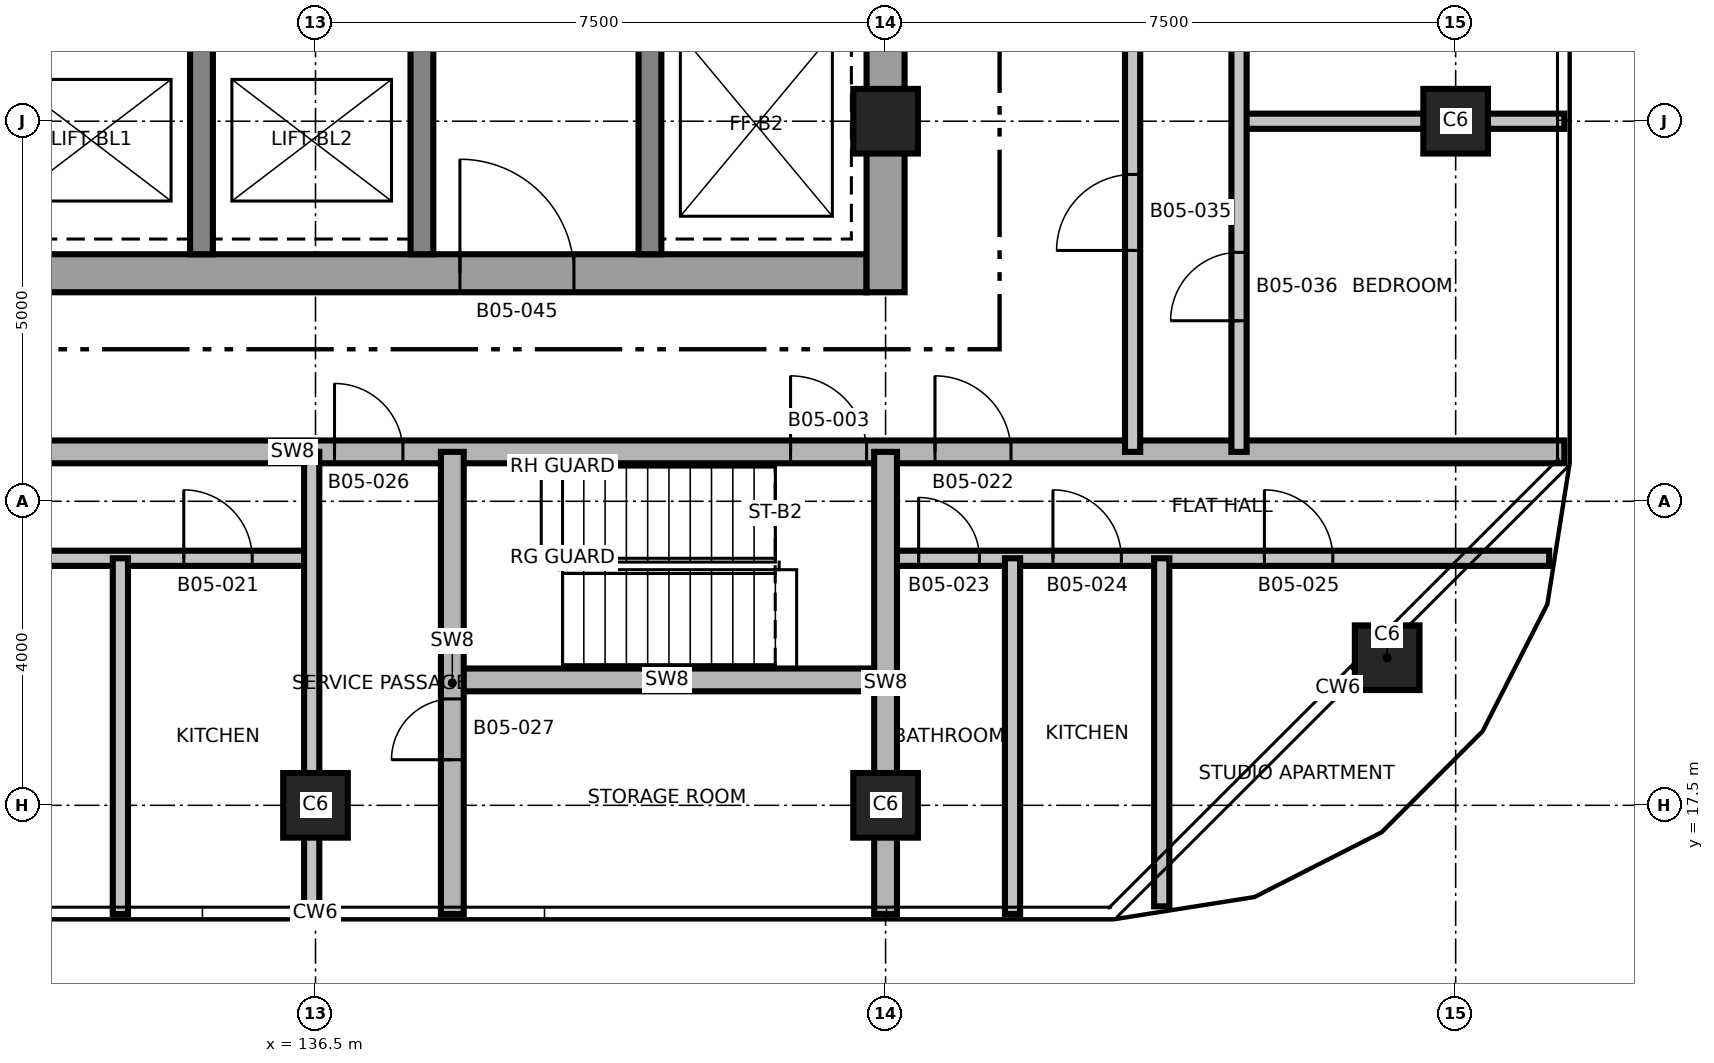
"""IFC4 building model, lengths in metres.
Left out: names, types, materials, properties, quantities, classifications, styles, units other than length and angle.
Written with IfcOpenShell. Run it as: python <this file> out.ifc"""

import sys

from ifc_helpers import new_model, si_unit, direction, frame, frame_2d, origin, origin_2d, place, context, subcontext, project, spatial, rectangle, extrude, element, fill, save


model = new_model("IFC4")
c1 = context("Model", 3, precision=1e-05, world=origin(), true_north=direction((0.0, 1.0)))
c2 = subcontext(c1, "Body", "Model", "MODEL_VIEW")
j1 = project(units=[si_unit("LENGTHUNIT", "METRE"), si_unit("PLANEANGLEUNIT", "RADIAN")], contexts=[c1])
p1 = place(None, origin())
s1 = spatial("IfcSite", under=j1, at=p1, CompositionType="ELEMENT")
p2 = place(p1, origin())
s2 = spatial("IfcBuilding", under=s1, at=p2, CompositionType="ELEMENT")
p3 = place(p2, frame((0.0, 0.0, 70.5)))
s3 = spatial("IfcBuildingStorey", under=s2, at=p3, CompositionType="ELEMENT", Elevation=70.5)
p4 = place(p3, frame((128.75, 24.5, 0.0), z_axis=(0.0, 0.0, 1.0), x_axis=(1.0, 0.0, 0.0)))
e1 = element("IfcWall", 1, at=p4, inside=s3, PredefinedType="SHEAR", context=c2, shape_type="SweptSolid", body=[
    extrude(rectangle(XDim=15.0, YDim=0.5, at=frame_2d((7.5, 0.0))), origin(), (0.0, 0.0, 1.0), 3.7),
])
p5 = place(p4, frame((9.65, 0.0, 0.0)))
e2 = element("IfcOpeningElement", 2, at=p5, cuts=e1, PredefinedType="OPENING", context=c2, shape_type="SweptSolid", body=[
    extrude(rectangle(XDim=1.5, YDim=2.1, at=frame_2d((0.75, 1.05))), frame((0.0, 0.26, 0.0), z_axis=(0.0, -1.0, 0.0), x_axis=(1.0, 0.0, 0.0)), (0.0, 0.0, 1.0), 0.52),
])
p6 = place(p4, frame((1.25, 0.0, 0.0)))
e3 = element("IfcOpeningElement", 3, at=p6, cuts=e1, PredefinedType="OPENING", context=c2, shape_type="SweptSolid", body=[
    extrude(rectangle(XDim=0.9, YDim=2.1, at=frame_2d((0.45, 1.05))), frame((0.0, 0.26, 0.0), z_axis=(0.0, -1.0, 0.0), x_axis=(1.0, 0.0, 0.0)), (0.0, 0.0, 1.0), 0.52),
])
p7 = place(p3, frame((144.0, 24.25, 0.0), z_axis=(0.0, 0.0, 1.0), x_axis=(0.0, 1.0, 0.0)))
e4 = element("IfcWall", 4, at=p7, inside=s3, PredefinedType="SHEAR", context=c2, shape_type="SweptSolid", body=[
    extrude(rectangle(XDim=13.5, YDim=0.5, at=frame_2d((6.75, 0.0))), origin(), (0.0, 0.0, 1.0), 3.7),
])
p8 = place(p3, frame((137.9, 24.75, 0.0), z_axis=(0.0, 0.0, 1.0), x_axis=(0.0, 1.0, 0.0)))
e5 = element("IfcWall", 5, at=p8, inside=s3, PredefinedType="SHEAR", context=c2, shape_type="SweptSolid", body=[
    extrude(rectangle(XDim=12.5, YDim=0.3, at=frame_2d((6.25, 0.0))), origin(), (0.0, 0.0, 1.0), 3.7),
])
p9 = place(p8, frame((3.95, 0.0, 0.0)))
e6 = element("IfcOpeningElement", 6, at=p9, cuts=e5, PredefinedType="OPENING", context=c2, shape_type="SweptSolid", body=[
    extrude(rectangle(XDim=1.5, YDim=2.1, at=frame_2d((0.75, 1.05))), frame((0.0, 0.16, 0.0), z_axis=(0.0, -1.0, 0.0), x_axis=(1.0, 0.0, 0.0)), (0.0, 0.0, 1.0), 0.32),
])
p10 = place(p8, frame((10.45, 0.0, 0.0)))
e7 = element("IfcOpeningElement", 7, at=p10, cuts=e5, PredefinedType="OPENING", context=c2, shape_type="SweptSolid", body=[
    extrude(rectangle(XDim=0.9, YDim=2.1, at=frame_2d((0.45, 1.05))), frame((0.0, 0.16, 0.0), z_axis=(0.0, -1.0, 0.0), x_axis=(1.0, 0.0, 0.0)), (0.0, 0.0, 1.0), 0.32),
])
p11 = place(p3, frame((140.9, 24.75, 0.0), z_axis=(0.0, 0.0, 1.0), x_axis=(0.0, 1.0, 0.0)))
e8 = element("IfcWall", 8, at=p11, inside=s3, PredefinedType="SHEAR", context=c2, shape_type="SweptSolid", body=[
    extrude(rectangle(XDim=12.5, YDim=0.3, at=frame_2d((6.25, 0.0))), origin(), (0.0, 0.0, 1.0), 3.7),
])
p12 = place(p11, frame((5.9, 0.0, 0.0)))
e9 = element("IfcOpeningElement", 9, at=p12, cuts=e8, PredefinedType="OPENING", context=c2, shape_type="SweptSolid", body=[
    extrude(rectangle(XDim=1.2, YDim=2.1, at=frame_2d((0.6, 1.05))), frame((0.0, 0.16, 0.0), z_axis=(0.0, -1.0, 0.0), x_axis=(1.0, 0.0, 0.0)), (0.0, 0.0, 1.0), 0.32),
])
p13 = place(p3, frame((135.0, 24.75, 0.0), z_axis=(0.0, 0.0, 1.0), x_axis=(0.0, 1.0, 0.0)))
e10 = element("IfcWall", 10, at=p13, inside=s3, PredefinedType="SHEAR", context=c2, shape_type="SweptSolid", body=[
    extrude(rectangle(XDim=2.8, YDim=0.3, at=frame_2d((1.4, 0.0))), origin(), (0.0, 0.0, 1.0), 3.7),
])
for number, where, z_axis, x_axis in (
    (11, (136.5, 17.5, 0.0), (0.0, 0.0, 1.0), (1.0, 0.0, 0.0)),
    (12, (144.0, 17.5, 0.0), (0.0, 0.0, 1.0), (1.0, 0.0, 0.0)),
    (13, (150.599, 19.442, 0.0), (0.0, 0.0, 1.0), (1.0, 0.0, 0.0)),
    (14, (144.0, 26.5, 0.0), (0.0, 0.0, 1.0), (1.0, 0.0, 0.0)),
    (15, (151.5, 26.5, 0.0), (0.0, 0.0, 1.0), (1.0, 0.0, 0.0)),
):
    element("IfcColumn", number, at=place(p3, frame(where, z_axis=z_axis, x_axis=x_axis)), inside=s3, PredefinedType="COLUMN", context=c2, shape_type="SweptSolid", body=[
        extrude(rectangle(XDim=0.85, YDim=0.85, at=origin_2d()), origin(), (0.0, 0.0, 1.0), 3.7),
    ])
p14 = place(p3, frame((138.25, 19.15, 0.0), z_axis=(0.0, 0.0, 1.0), x_axis=(1.0, 0.0, 0.0)))
e16 = element("IfcWall", 16, at=p14, inside=s3, PredefinedType="SHEAR", context=c2, shape_type="SweptSolid", body=[
    extrude(rectangle(XDim=5.75, YDim=0.3, at=frame_2d((2.875, 0.0))), origin(), (0.0, 0.0, 1.0), 3.4),
])
p15 = place(p3, frame((120.269, 20.75, 0.0), z_axis=(0.0, 0.0, 1.0), x_axis=(1.0, 0.0, 0.0)))
e17 = element("IfcWall", 17, at=p15, inside=s3, PredefinedType="PARTITIONING", context=c2, shape_type="SweptSolid", body=[
    extrude(rectangle(XDim=16.231, YDim=0.2, at=frame_2d((8.115, 0.0))), origin(), (0.0, 0.0, 1.0), 3.4),
])
p16 = place(p15, frame((0.414, 0.0, 0.0)))
e18 = element("IfcOpeningElement", 18, at=p16, cuts=e17, PredefinedType="OPENING", context=c2, shape_type="SweptSolid", body=[
    extrude(rectangle(XDim=0.9, YDim=2.1, at=frame_2d((0.45, 1.05))), frame((0.0, 0.11, 0.0), z_axis=(0.0, -1.0, 0.0), x_axis=(1.0, 0.0, 0.0)), (0.0, 0.0, 1.0), 0.22),
])
p17 = place(p15, frame((4.581, 0.0, 0.0)))
e19 = element("IfcOpeningElement", 19, at=p17, cuts=e17, PredefinedType="OPENING", context=c2, shape_type="SweptSolid", body=[
    extrude(rectangle(XDim=0.9, YDim=2.1, at=frame_2d((0.45, 1.05))), frame((0.0, 0.11, 0.0), z_axis=(0.0, -1.0, 0.0), x_axis=(1.0, 0.0, 0.0)), (0.0, 0.0, 1.0), 0.22),
])
p18 = place(p15, frame((7.381, 0.0, 0.0)))
e20 = element("IfcOpeningElement", 20, at=p18, cuts=e17, PredefinedType="OPENING", context=c2, shape_type="SweptSolid", body=[
    extrude(rectangle(XDim=0.8, YDim=2.1, at=frame_2d((0.4, 1.05))), frame((0.0, 0.11, 0.0), z_axis=(0.0, -1.0, 0.0), x_axis=(1.0, 0.0, 0.0)), (0.0, 0.0, 1.0), 0.22),
])
p19 = place(p15, frame((10.748, 0.0, 0.0)))
e21 = element("IfcOpeningElement", 21, at=p19, cuts=e17, PredefinedType="OPENING", context=c2, shape_type="SweptSolid", body=[
    extrude(rectangle(XDim=0.9, YDim=2.1, at=frame_2d((0.45, 1.05))), frame((0.0, 0.11, 0.0), z_axis=(0.0, -1.0, 0.0), x_axis=(1.0, 0.0, 0.0)), (0.0, 0.0, 1.0), 0.22),
])
p20 = place(p15, frame((14.498, 0.0, 0.0)))
e22 = element("IfcOpeningElement", 22, at=p20, cuts=e17, PredefinedType="OPENING", context=c2, shape_type="SweptSolid", body=[
    extrude(rectangle(XDim=0.9, YDim=2.1, at=frame_2d((0.45, 1.05))), frame((0.0, 0.11, 0.0), z_axis=(0.0, -1.0, 0.0), x_axis=(1.0, 0.0, 0.0)), (0.0, 0.0, 1.0), 0.22),
])
p21 = place(p3, frame((144.0, 20.75, 0.0), z_axis=(0.0, 0.0, 1.0), x_axis=(1.0, 0.0, 0.0)))
e23 = element("IfcWall", 23, at=p21, inside=s3, PredefinedType="PARTITIONING", context=c2, shape_type="SweptSolid", body=[
    extrude(rectangle(XDim=8.731, YDim=0.2, at=frame_2d((4.365, 0.0))), origin(), (0.0, 0.0, 1.0), 3.4),
])
p22 = place(p21, frame((0.435, 0.0, 0.0)))
e24 = element("IfcOpeningElement", 24, at=p22, cuts=e23, PredefinedType="OPENING", context=c2, shape_type="SweptSolid", body=[
    extrude(rectangle(XDim=0.8, YDim=2.1, at=frame_2d((0.4, 1.05))), frame((0.0, 0.11, 0.0), z_axis=(0.0, -1.0, 0.0), x_axis=(1.0, 0.0, 0.0)), (0.0, 0.0, 1.0), 0.22),
])
p23 = place(p21, frame((2.202, 0.0, 0.0)))
e25 = element("IfcOpeningElement", 25, at=p23, cuts=e23, PredefinedType="OPENING", context=c2, shape_type="SweptSolid", body=[
    extrude(rectangle(XDim=0.9, YDim=2.1, at=frame_2d((0.45, 1.05))), frame((0.0, 0.11, 0.0), z_axis=(0.0, -1.0, 0.0), x_axis=(1.0, 0.0, 0.0)), (0.0, 0.0, 1.0), 0.22),
])
p24 = place(p21, frame((4.984, 0.0, 0.0)))
e26 = element("IfcOpeningElement", 26, at=p24, cuts=e23, PredefinedType="OPENING", context=c2, shape_type="SweptSolid", body=[
    extrude(rectangle(XDim=0.9, YDim=2.1, at=frame_2d((0.45, 1.05))), frame((0.0, 0.11, 0.0), z_axis=(0.0, -1.0, 0.0), x_axis=(1.0, 0.0, 0.0)), (0.0, 0.0, 1.0), 0.22),
])
p25 = place(p3, frame((120.07, 22.15, 0.0), z_axis=(0.0, 0.0, 1.0), x_axis=(1.0, 0.0, 0.0)))
e27 = element("IfcWall", 27, at=p25, inside=s3, PredefinedType="SHEAR", context=c2, shape_type="SweptSolid", body=[
    extrude(rectangle(XDim=32.86, YDim=0.3, at=frame_2d((16.43, 0.0))), origin(), (0.0, 0.0, 1.0), 3.4),
])
p26 = place(p25, frame((22.68, 0.0, 0.0)))
e28 = element("IfcOpeningElement", 28, at=p26, cuts=e27, PredefinedType="OPENING", context=c2, shape_type="SweptSolid", body=[
    extrude(rectangle(XDim=1.0, YDim=2.1, at=frame_2d((0.5, 1.05))), frame((0.0, 0.16, 0.0), z_axis=(0.0, -1.0, 0.0), x_axis=(1.0, 0.0, 0.0)), (0.0, 0.0, 1.0), 0.32),
])
p27 = place(p25, frame((11.03, 0.0, 0.0)))
e29 = element("IfcOpeningElement", 29, at=p27, cuts=e27, PredefinedType="OPENING", context=c2, shape_type="SweptSolid", body=[
    extrude(rectangle(XDim=1.0, YDim=2.1, at=frame_2d((0.5, 1.05))), frame((0.0, 0.16, 0.0), z_axis=(0.0, -1.0, 0.0), x_axis=(1.0, 0.0, 0.0)), (0.0, 0.0, 1.0), 0.32),
])
p28 = place(p25, frame((24.58, 0.0, 0.0)))
e30 = element("IfcOpeningElement", 30, at=p28, cuts=e27, PredefinedType="OPENING", context=c2, shape_type="SweptSolid", body=[
    extrude(rectangle(XDim=1.0, YDim=2.1, at=frame_2d((0.5, 1.05))), frame((0.0, 0.16, 0.0), z_axis=(0.0, -1.0, 0.0), x_axis=(1.0, 0.0, 0.0)), (0.0, 0.0, 1.0), 0.32),
])
p29 = place(p25, frame((16.68, 0.0, 0.0)))
e31 = element("IfcOpeningElement", 31, at=p29, cuts=e27, PredefinedType="OPENING", context=c2, shape_type="SweptSolid", body=[
    extrude(rectangle(XDim=0.9, YDim=2.1, at=frame_2d((0.45, 1.05))), frame((0.0, 0.16, 0.0), z_axis=(0.0, -1.0, 0.0), x_axis=(1.0, 0.0, 0.0)), (0.0, 0.0, 1.0), 0.32),
])
p30 = place(p3, frame((148.65, 26.5, 0.0), z_axis=(0.0, 0.0, 1.0), x_axis=(1.0, 0.0, 0.0)))
e32 = element("IfcWall", 32, at=p30, inside=s3, PredefinedType="PARTITIONING", context=c2, shape_type="SweptSolid", body=[
    extrude(rectangle(XDim=4.28, YDim=0.2, at=frame_2d((2.14, 0.0))), origin(), (0.0, 0.0, 1.0), 3.4),
])
p31 = place(p3, frame((133.933, 16.07, 0.0), z_axis=(0.0, 0.0, 1.0), x_axis=(0.0, 1.0, 0.0)))
e33 = element("IfcWall", 33, at=p31, inside=s3, PredefinedType="PARTITIONING", context=c2, shape_type="SweptSolid", body=[
    extrude(rectangle(XDim=4.68, YDim=0.2, at=frame_2d((2.34, 0.0))), origin(), (0.0, 0.0, 1.0), 3.4),
])
p32 = place(p3, frame((136.45, 16.07, 0.0), z_axis=(0.0, 0.0, 1.0), x_axis=(0.0, 1.0, 0.0)))
e34 = element("IfcWall", 34, at=p32, inside=s3, PredefinedType="PARTITIONING", context=c2, shape_type="SweptSolid", body=[
    extrude(rectangle(XDim=6.08, YDim=0.2, at=frame_2d((3.04, 0.0))), origin(), (0.0, 0.0, 1.0), 3.4),
])
p33 = place(p3, frame((138.3, 16.07, 0.0), z_axis=(0.0, 0.0, 1.0), x_axis=(0.0, 1.0, 0.0)))
e35 = element("IfcWall", 35, at=p33, inside=s3, PredefinedType="SHEAR", context=c2, shape_type="SweptSolid", body=[
    extrude(rectangle(XDim=6.08, YDim=0.3, at=frame_2d((3.04, 0.0))), origin(), (0.0, 0.0, 1.0), 3.4),
])
p34 = place(p33, frame((2.03, 0.0, 0.0)))
e36 = element("IfcOpeningElement", 36, at=p34, cuts=e35, PredefinedType="OPENING", context=c2, shape_type="SweptSolid", body=[
    extrude(rectangle(XDim=0.8, YDim=2.1, at=frame_2d((0.4, 1.05))), frame((0.0, 0.16, 0.0), z_axis=(0.0, -1.0, 0.0), x_axis=(1.0, 0.0, 0.0)), (0.0, 0.0, 1.0), 0.32),
])
p35 = place(p3, frame((144.0, 16.07, 0.0), z_axis=(0.0, 0.0, 1.0), x_axis=(0.0, 1.0, 0.0)))
e37 = element("IfcWall", 37, at=p35, inside=s3, PredefinedType="SHEAR", context=c2, shape_type="SweptSolid", body=[
    extrude(rectangle(XDim=6.08, YDim=0.3, at=frame_2d((3.04, 0.0))), origin(), (0.0, 0.0, 1.0), 3.4),
])
p36 = place(p3, frame((145.67, 16.07, 0.0), z_axis=(0.0, 0.0, 1.0), x_axis=(0.0, 1.0, 0.0)))
e38 = element("IfcWall", 38, at=p36, inside=s3, PredefinedType="PARTITIONING", context=c2, shape_type="SweptSolid", body=[
    extrude(rectangle(XDim=4.68, YDim=0.2, at=frame_2d((2.34, 0.0))), origin(), (0.0, 0.0, 1.0), 3.4),
])
p37 = place(p3, frame((147.25, 22.15, 0.0), z_axis=(0.0, 0.0, 1.0), x_axis=(0.0, 1.0, 0.0)))
e39 = element("IfcWall", 39, at=p37, inside=s3, PredefinedType="PARTITIONING", context=c2, shape_type="SweptSolid", body=[
    extrude(rectangle(XDim=17.7, YDim=0.2, at=frame_2d((8.85, 0.0))), origin(), (0.0, 0.0, 1.0), 3.4),
])
p38 = place(p37, frame((2.65, 0.0, 0.0)))
e40 = element("IfcOpeningElement", 40, at=p38, cuts=e39, PredefinedType="OPENING", context=c2, shape_type="SweptSolid", body=[
    extrude(rectangle(XDim=1.0, YDim=2.1, at=frame_2d((0.5, 1.05))), frame((0.0, 0.11, 0.0), z_axis=(0.0, -1.0, 0.0), x_axis=(1.0, 0.0, 0.0)), (0.0, 0.0, 1.0), 0.22),
])
p39 = place(p3, frame((147.633, 16.171, 0.0), z_axis=(0.0, 0.0, 1.0), x_axis=(0.0, 1.0, 0.0)))
e41 = element("IfcWall", 41, at=p39, inside=s3, PredefinedType="PARTITIONING", context=c2, shape_type="SweptSolid", body=[
    extrude(rectangle(XDim=4.579, YDim=0.2, at=frame_2d((2.29, 0.0))), origin(), (0.0, 0.0, 1.0), 3.4),
])
p40 = place(p3, frame((148.65, 22.15, 0.0), z_axis=(0.0, 0.0, 1.0), x_axis=(0.0, 1.0, 0.0)))
e42 = element("IfcWall", 42, at=p40, inside=s3, PredefinedType="PARTITIONING", context=c2, shape_type="SweptSolid", body=[
    extrude(rectangle(XDim=17.7, YDim=0.2, at=frame_2d((8.85, 0.0))), origin(), (0.0, 0.0, 1.0), 3.4),
])
p41 = place(p40, frame((1.725, 0.0, 0.0)))
e43 = element("IfcOpeningElement", 43, at=p41, cuts=e42, PredefinedType="OPENING", context=c2, shape_type="SweptSolid", body=[
    extrude(rectangle(XDim=0.9, YDim=2.1, at=frame_2d((0.45, 1.05))), frame((0.0, 0.11, 0.0), z_axis=(0.0, -1.0, 0.0), x_axis=(1.0, 0.0, 0.0)), (0.0, 0.0, 1.0), 0.22),
])
p42 = place(p40, frame((6.867, 0.0, 0.0)))
e44 = element("IfcOpeningElement", 44, at=p42, cuts=e42, PredefinedType="OPENING", context=c2, shape_type="SweptSolid", body=[
    extrude(rectangle(XDim=0.9, YDim=2.1, at=frame_2d((0.45, 1.05))), frame((0.0, 0.11, 0.0), z_axis=(0.0, -1.0, 0.0), x_axis=(1.0, 0.0, 0.0)), (0.0, 0.0, 1.0), 0.22),
])
p43 = place(p40, frame((11.367, 0.0, 0.0)))
e45 = element("IfcOpeningElement", 45, at=p43, cuts=e42, PredefinedType="OPENING", context=c2, shape_type="SweptSolid", body=[
    extrude(rectangle(XDim=0.9, YDim=2.1, at=frame_2d((0.45, 1.05))), frame((0.0, 0.11, 0.0), z_axis=(0.0, -1.0, 0.0), x_axis=(1.0, 0.0, 0.0)), (0.0, 0.0, 1.0), 0.22),
])
p44 = place(p40, frame((14.378, 0.0, 0.0)))
e46 = element("IfcOpeningElement", 46, at=p44, cuts=e42, PredefinedType="OPENING", context=c2, shape_type="SweptSolid", body=[
    extrude(rectangle(XDim=0.9, YDim=2.1, at=frame_2d((0.45, 1.05))), frame((0.0, 0.11, 0.0), z_axis=(0.0, -1.0, 0.0), x_axis=(1.0, 0.0, 0.0)), (0.0, 0.0, 1.0), 0.22),
])
p45 = place(p40, frame((16.603, 0.0, 0.0)))
e47 = element("IfcOpeningElement", 47, at=p45, cuts=e42, PredefinedType="OPENING", context=c2, shape_type="SweptSolid", body=[
    extrude(rectangle(XDim=0.8, YDim=2.1, at=frame_2d((0.4, 1.05))), frame((0.0, 0.11, 0.0), z_axis=(0.0, -1.0, 0.0), x_axis=(1.0, 0.0, 0.0)), (0.0, 0.0, 1.0), 0.22),
])
p46 = place(p26, origin())
e48 = element("IfcDoor", 48, at=p46, inside=s3, OperationType="SINGLE_SWING_LEFT", PredefinedType="DOOR", context=c2, shape_type="SweptSolid", body=[
    extrude(rectangle(XDim=1.0, YDim=2.1, at=frame_2d((0.5, 1.05))), frame((0.0, 0.025, 0.0), z_axis=(0.0, -1.0, 0.0), x_axis=(1.0, 0.0, 0.0)), (0.0, 0.0, 1.0), 0.05),
])
fill(e28, e48)
p47 = place(p20, origin())
e49 = element("IfcDoor", 49, at=p47, inside=s3, OperationType="SINGLE_SWING_LEFT", PredefinedType="DOOR", context=c2, shape_type="SweptSolid", body=[
    extrude(rectangle(XDim=0.9, YDim=2.1, at=frame_2d((0.45, 1.05))), frame((0.0, 0.025, 0.0), z_axis=(0.0, -1.0, 0.0), x_axis=(1.0, 0.0, 0.0)), (0.0, 0.0, 1.0), 0.05),
])
fill(e22, e49)
p48 = place(p28, origin())
e50 = element("IfcDoor", 50, at=p48, inside=s3, OperationType="SINGLE_SWING_RIGHT", PredefinedType="DOOR", context=c2, shape_type="SweptSolid", body=[
    extrude(rectangle(XDim=1.0, YDim=2.1, at=frame_2d((0.5, 1.05))), frame((0.0, 0.025, 0.0), z_axis=(0.0, -1.0, 0.0), x_axis=(1.0, 0.0, 0.0)), (0.0, 0.0, 1.0), 0.05),
])
fill(e30, e50)
p49 = place(p22, origin())
e51 = element("IfcDoor", 51, at=p49, inside=s3, OperationType="SINGLE_SWING_LEFT", PredefinedType="DOOR", context=c2, shape_type="SweptSolid", body=[
    extrude(rectangle(XDim=0.8, YDim=2.1, at=frame_2d((0.4, 1.05))), frame((0.0, 0.025, 0.0), z_axis=(0.0, -1.0, 0.0), x_axis=(1.0, 0.0, 0.0)), (0.0, 0.0, 1.0), 0.05),
])
fill(e24, e51)
p50 = place(p23, origin())
e52 = element("IfcDoor", 52, at=p50, inside=s3, OperationType="SINGLE_SWING_RIGHT", PredefinedType="DOOR", context=c2, shape_type="SweptSolid", body=[
    extrude(rectangle(XDim=0.9, YDim=2.1, at=frame_2d((0.45, 1.05))), frame((0.0, 0.025, 0.0), z_axis=(0.0, -1.0, 0.0), x_axis=(1.0, 0.0, 0.0)), (0.0, 0.0, 1.0), 0.05),
])
fill(e25, e52)
p51 = place(p24, origin())
e53 = element("IfcDoor", 53, at=p51, inside=s3, OperationType="SINGLE_SWING_LEFT", PredefinedType="DOOR", context=c2, shape_type="SweptSolid", body=[
    extrude(rectangle(XDim=0.9, YDim=2.1, at=frame_2d((0.45, 1.05))), frame((0.0, 0.025, 0.0), z_axis=(0.0, -1.0, 0.0), x_axis=(1.0, 0.0, 0.0)), (0.0, 0.0, 1.0), 0.05),
])
fill(e26, e53)
p52 = place(p29, origin())
e54 = element("IfcDoor", 54, at=p52, inside=s3, OperationType="SINGLE_SWING_RIGHT", PredefinedType="DOOR", context=c2, shape_type="SweptSolid", body=[
    extrude(rectangle(XDim=0.9, YDim=2.1, at=frame_2d((0.45, 1.05))), frame((0.0, 0.025, 0.0), z_axis=(0.0, -1.0, 0.0), x_axis=(1.0, 0.0, 0.0)), (0.0, 0.0, 1.0), 0.05),
])
fill(e31, e54)
p53 = place(p34, origin())
e55 = element("IfcDoor", 55, at=p53, inside=s3, OperationType="SINGLE_SWING_LEFT", PredefinedType="DOOR", context=c2, shape_type="SweptSolid", body=[
    extrude(rectangle(XDim=0.8, YDim=2.1, at=frame_2d((0.4, 1.05))), frame((0.0, 0.025, 0.0), z_axis=(0.0, -1.0, 0.0), x_axis=(1.0, 0.0, 0.0)), (0.0, 0.0, 1.0), 0.05),
])
fill(e36, e55)
p54 = place(p38, origin())
e56 = element("IfcDoor", 56, at=p54, inside=s3, OperationType="SINGLE_SWING_LEFT", PredefinedType="DOOR", context=c2, shape_type="SweptSolid", body=[
    extrude(rectangle(XDim=1.0, YDim=2.1, at=frame_2d((0.5, 1.05))), frame((0.0, 0.025, 0.0), z_axis=(0.0, -1.0, 0.0), x_axis=(1.0, 0.0, 0.0)), (0.0, 0.0, 1.0), 0.05),
])
fill(e40, e56)
p55 = place(p41, origin())
e57 = element("IfcDoor", 57, at=p55, inside=s3, OperationType="SINGLE_SWING_RIGHT", PredefinedType="DOOR", context=c2, shape_type="SweptSolid", body=[
    extrude(rectangle(XDim=0.9, YDim=2.1, at=frame_2d((0.45, 1.05))), frame((0.0, 0.025, 0.0), z_axis=(0.0, -1.0, 0.0), x_axis=(1.0, 0.0, 0.0)), (0.0, 0.0, 1.0), 0.05),
])
fill(e43, e57)
p56 = place(p5, origin())
e58 = element("IfcDoor", 58, at=p56, inside=s3, OperationType="SINGLE_SWING_LEFT", PredefinedType="DOOR", context=c2, shape_type="SweptSolid", body=[
    extrude(rectangle(XDim=1.5, YDim=2.1, at=frame_2d((0.75, 1.05))), frame((0.0, 0.025, 0.0), z_axis=(0.0, -1.0, 0.0), x_axis=(1.0, 0.0, 0.0)), (0.0, 0.0, 1.0), 0.05),
])
fill(e2, e58)
save(model, sys.argv[1])
